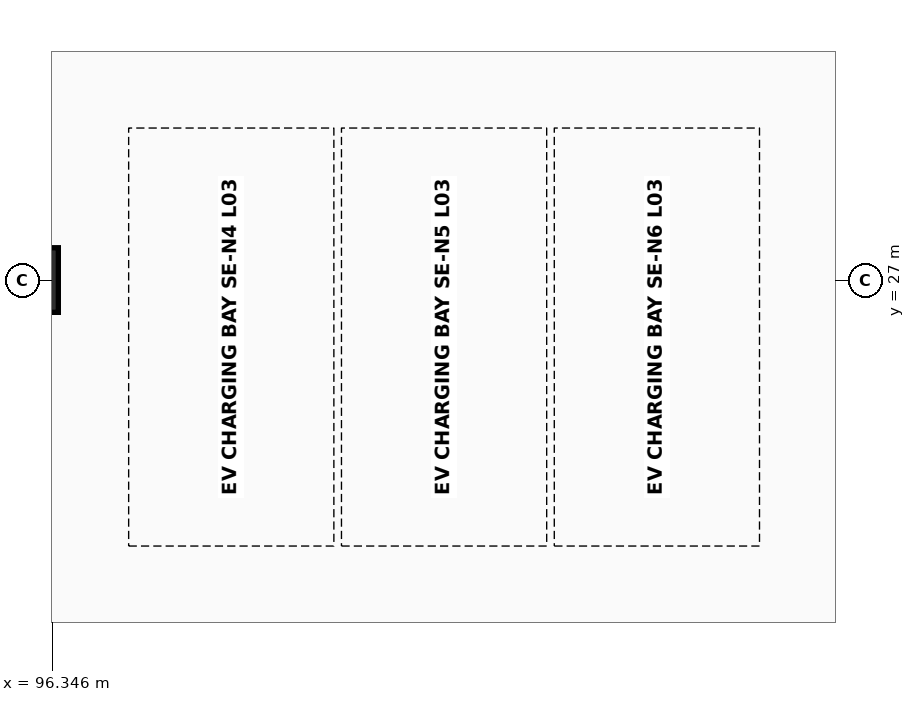
"""IFC4 building model, lengths in metres.
Left out: names, types, materials, properties, quantities, classifications, styles, units other than length and angle.
Written with IfcOpenShell. Run it as: python <this file> out.ifc"""

import sys

from ifc_helpers import new_model, si_unit, direction, frame, origin, origin_2d, place, context, subcontext, project, spatial, rectangle, extrude, element, save


model = new_model("IFC4")
c1 = context("Model", 3, precision=1e-05, world=origin(), true_north=direction((0.0, 1.0)))
c2 = subcontext(c1, "Body", "Model", "MODEL_VIEW")
j1 = project(units=[si_unit("LENGTHUNIT", "METRE"), si_unit("PLANEANGLEUNIT", "RADIAN")], contexts=[c1])
p1 = place(None, origin())
s1 = spatial("IfcSite", under=j1, at=p1, CompositionType="ELEMENT")
p2 = place(p1, origin())
s2 = spatial("IfcBuilding", under=s1, at=p2, CompositionType="ELEMENT")
p3 = place(p2, frame((0.0, 0.0, 13.4)))
s3 = spatial("IfcBuildingStorey", under=s2, at=p3, CompositionType="ELEMENT", Elevation=13.4)
p4 = place(p3, frame((96.0, 27.0, 0.0), z_axis=(0.0, 0.0, 1.0), x_axis=(1.0, 0.0, 0.0)))
e1 = element("IfcColumn", 1, at=p4, inside=s3, PredefinedType="COLUMN", context=c2, shape_type="SweptSolid", body=[
    extrude(rectangle(XDim=0.85, YDim=0.85, at=origin_2d()), origin(), (0.0, 0.0, 1.0), 3.8),
])
save(model, sys.argv[1])
